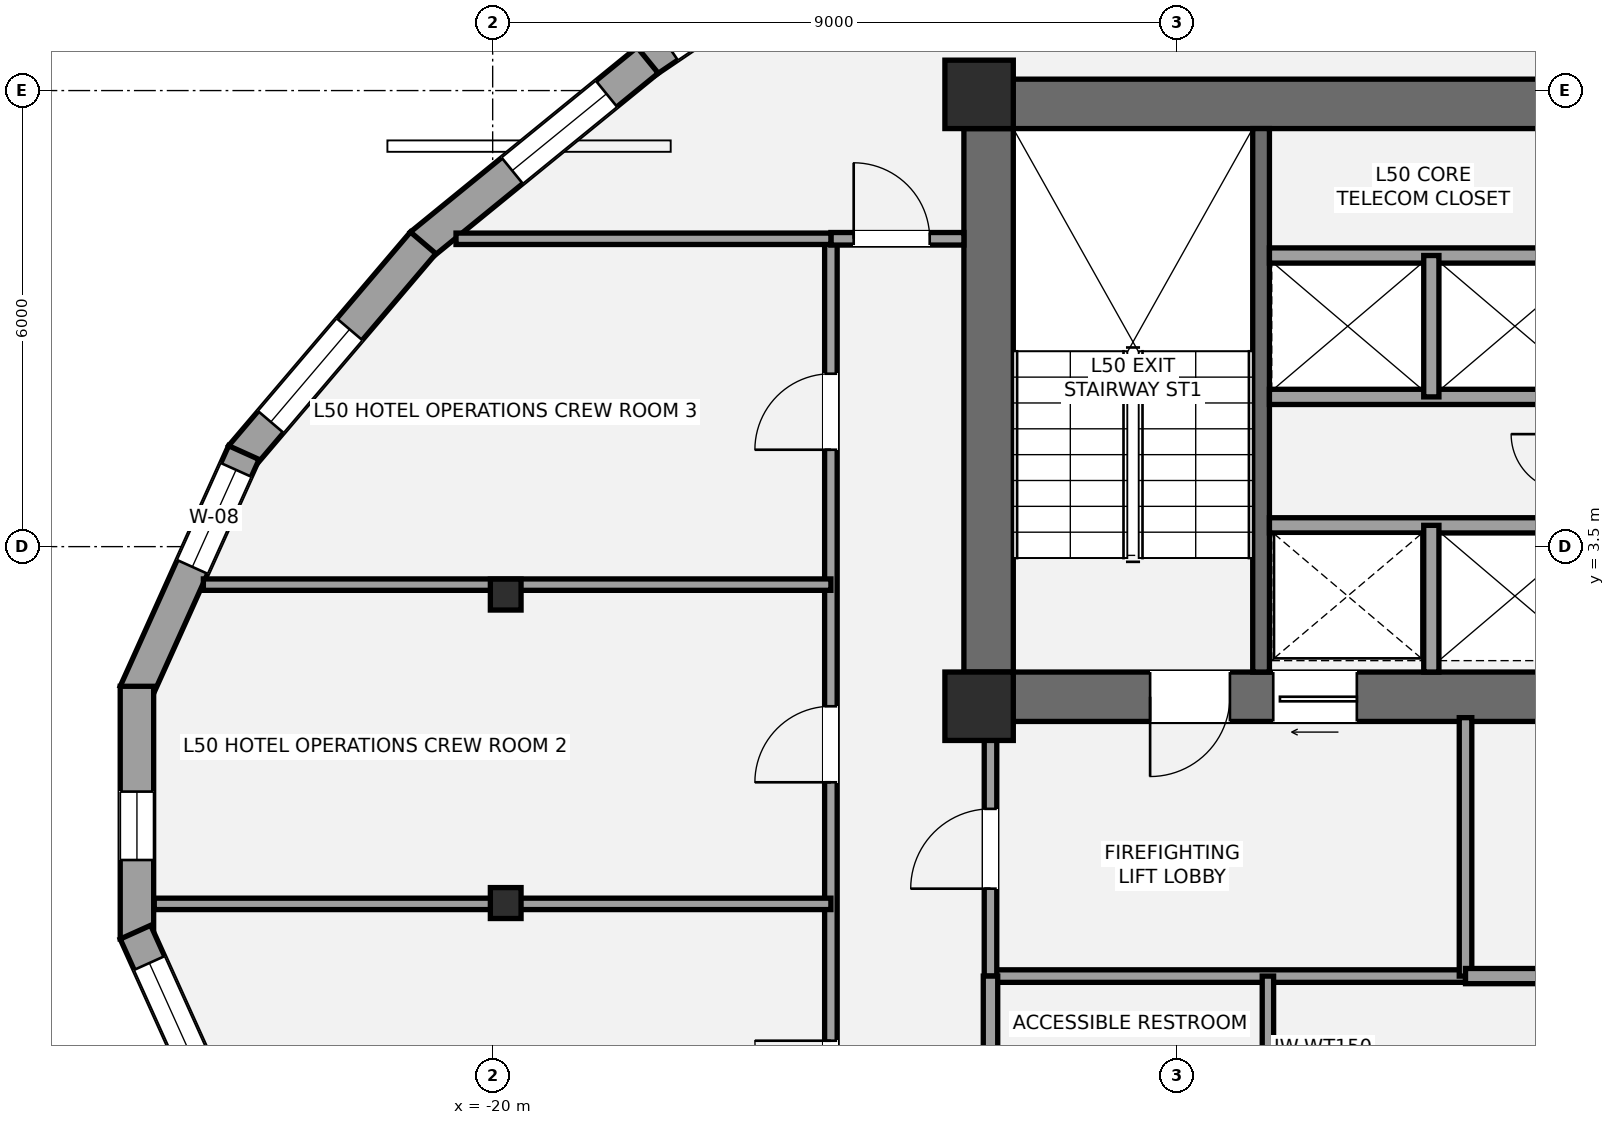
"""IFC4 building model, lengths in metres.
Left out: names, types, materials, properties, quantities, classifications, styles, units other than length and angle.
Written with IfcOpenShell. Run it as: python <this file> out.ifc"""

import sys

from ifc_helpers import new_model, si_unit, direction, frame, frame_2d, origin, origin_2d, place, context, subcontext, project, spatial, rectangle, i_section, extrude, element, fill, save


model = new_model("IFC4")
c1 = context("Model", 3, precision=1e-05, world=origin(), true_north=direction((0.0, 1.0)))
c2 = subcontext(c1, "Body", "Model", "MODEL_VIEW")
j1 = project(units=[si_unit("LENGTHUNIT", "METRE"), si_unit("PLANEANGLEUNIT", "RADIAN")], contexts=[c1])
p1 = place(None, origin())
s1 = spatial("IfcSite", under=j1, at=p1, CompositionType="ELEMENT")
p2 = place(p1, origin())
s2 = spatial("IfcBuilding", under=s1, at=p2, CompositionType="ELEMENT")
p3 = place(p2, frame((0.0, 0.0, 182.2)))
s3 = spatial("IfcBuildingStorey", under=s2, at=p3, CompositionType="ELEMENT", Elevation=182.2)
p4 = place(p3, frame((-13.475, 1.2, 0.0), z_axis=(0.0, 0.0, 1.0), x_axis=(0.0, 1.0, 0.0)))
e1 = element("IfcWall", 1, at=p4, inside=s3, PredefinedType="SHEAR", context=c2, shape_type="SweptSolid", body=[
    extrude(rectangle(XDim=8.45, YDim=0.65, at=frame_2d((4.225, 0.0))), origin(), (0.0, 0.0, 1.0), 3.2),
])
p5 = place(p3, frame((-13.8, 9.325, 0.0), z_axis=(0.0, 0.0, 1.0), x_axis=(1.0, 0.0, 0.0)))
e2 = element("IfcWall", 2, at=p5, inside=s3, PredefinedType="SHEAR", context=c2, shape_type="SweptSolid", body=[
    extrude(rectangle(XDim=9.325, YDim=0.65, at=frame_2d((4.663, 0.0))), origin(), (0.0, 0.0, 1.0), 3.2),
])
p6 = place(p3, frame((-4.875, 1.525, 0.0), z_axis=(0.0, 0.0, 1.0), x_axis=(-1.0, 0.0, 0.0)))
e3 = element("IfcWall", 3, at=p6, inside=s3, PredefinedType="SHEAR", context=c2, shape_type="SweptSolid", body=[
    extrude(rectangle(XDim=8.925, YDim=0.65, at=frame_2d((4.462, 0.0))), origin(), (0.0, 0.0, 1.0), 3.2),
])
p7 = place(p6, frame((5.425, 0.0, 0.0)))
e4 = element("IfcOpeningElement", 4, at=p7, cuts=e3, PredefinedType="OPENING", context=c2, shape_type="SweptSolid", body=[
    extrude(rectangle(XDim=1.05, YDim=2.15, at=frame_2d((0.525, 1.075))), frame((0.0, 0.335, 0.0), z_axis=(0.0, -1.0, 0.0), x_axis=(1.0, 0.0, 0.0)), (0.0, 0.0, 1.0), 0.67),
])
p8 = place(p6, frame((3.755, 0.0, 0.0)))
e5 = element("IfcOpeningElement", 5, at=p8, cuts=e3, PredefinedType="OPENING", context=c2, shape_type="SweptSolid", body=[
    extrude(rectangle(XDim=1.1, YDim=2.2, at=frame_2d((0.55, 1.1))), frame((0.0, 0.335, 0.0), z_axis=(0.0, -1.0, 0.0), x_axis=(1.0, 0.0, 0.0)), (0.0, 0.0, 1.0), 0.67),
])
p9 = place(p3, frame((-9.89, 1.85, 0.0), z_axis=(0.0, 0.0, 1.0), x_axis=(0.0, 1.0, 0.0)))
e6 = element("IfcWall", 6, at=p9, inside=s3, PredefinedType="SHEAR", context=c2, shape_type="SweptSolid", body=[
    extrude(rectangle(XDim=7.15, YDim=0.22, at=frame_2d((3.575, 0.0))), origin(), (0.0, 0.0, 1.0), 3.2),
])
for number, where, z_axis, x_axis in (
    (7, (-13.6, 1.4, 0.0), (0.0, 0.0, 1.0), (1.0, 0.0, 0.0)),
    (8, (-13.6, 9.45, 0.0), (0.0, 0.0, 1.0), (1.0, 0.0, 0.0)),
):
    element("IfcColumn", number, at=place(p3, frame(where, z_axis=z_axis, x_axis=x_axis)), inside=s3, PredefinedType="COLUMN", context=c2, shape_type="SweptSolid", body=[
        extrude(rectangle(XDim=0.9, YDim=0.9, at=origin_2d()), origin(), (0.0, 0.0, 1.0), 3.2),
    ])
for number, where, z_axis, x_axis in (
    (9, (-19.828, 2.869, 0.0), (0.0, 0.0, 1.0), (1.0, 0.0, 0.0)),
    (10, (-19.828, -1.189, 0.0), (0.0, 0.0, 1.0), (1.0, 0.0, 0.0)),
):
    element("IfcColumn", number, at=place(p3, frame(where, z_axis=z_axis, x_axis=x_axis)), inside=s3, PredefinedType="COLUMN", context=c2, shape_type="SweptSolid", body=[
        extrude(i_section(OverallWidth=0.404, OverallDepth=0.407, WebThickness=0.027, FlangeThickness=0.044, at=origin_2d()), origin(), (0.0, 0.0, 1.0), 3.2),
    ])
p10 = place(p3, frame((-17.976, 9.888, 0.0), z_axis=(0.0, 0.0, 1.0), x_axis=(0.827733986143, 0.561120707321, 0.0)))
e11 = element("IfcWall", 11, at=p10, inside=s3, PredefinedType="STANDARD", context=c2, shape_type="SweptSolid", body=[
    extrude(rectangle(XDim=3.921, YDim=0.44, at=frame_2d((1.96, 0.0))), origin(), (0.0, 0.0, 1.0), 2.315),
])
p11 = place(p10, frame((0.348, 0.0, 0.58)))
e12 = element("IfcOpeningElement", 12, at=p11, cuts=e11, PredefinedType="OPENING", context=c2, shape_type="SweptSolid", body=[
    extrude(rectangle(XDim=1.4, YDim=1.55, at=frame_2d((0.7, 0.775))), frame((0.0, 0.23, 0.0), z_axis=(0.0, -1.0, 0.0), x_axis=(1.0, 0.0, 0.0)), (0.0, 0.0, 1.0), 0.46),
])
p12 = place(p3, frame((-20.943, 7.469, 0.0), z_axis=(0.0, 0.0, 1.0), x_axis=(0.77522232587, 0.631688487684, 0.0)))
e13 = element("IfcWall", 13, at=p12, inside=s3, PredefinedType="STANDARD", context=c2, shape_type="SweptSolid", body=[
    extrude(rectangle(XDim=3.847, YDim=0.44, at=frame_2d((1.924, 0.0))), origin(), (0.0, 0.0, 1.0), 2.315),
])
p13 = place(p12, frame((1.548, 0.0, 0.58)))
e14 = element("IfcOpeningElement", 14, at=p13, cuts=e13, PredefinedType="OPENING", context=c2, shape_type="SweptSolid", body=[
    extrude(rectangle(XDim=1.6, YDim=1.55, at=frame_2d((0.8, 0.775))), frame((0.0, 0.23, 0.0), z_axis=(0.0, -1.0, 0.0), x_axis=(1.0, 0.0, 0.0)), (0.0, 0.0, 1.0), 0.46),
])
p14 = place(p3, frame((-23.307, 4.685, 0.0), z_axis=(0.0, 0.0, 1.0), x_axis=(0.648014991522, 0.761627580096, 0.0)))
e15 = element("IfcWall", 15, at=p14, inside=s3, PredefinedType="STANDARD", context=c2, shape_type="SweptSolid", body=[
    extrude(rectangle(XDim=3.692, YDim=0.44, at=frame_2d((1.846, 0.0))), origin(), (0.0, 0.0, 1.0), 2.315),
])
p15 = place(p14, frame((0.598, 0.0, 0.58)))
e16 = element("IfcOpeningElement", 16, at=p15, cuts=e15, PredefinedType="OPENING", context=c2, shape_type="SweptSolid", body=[
    extrude(rectangle(XDim=1.6, YDim=1.55, at=frame_2d((0.8, 0.775))), frame((0.0, 0.23, 0.0), z_axis=(0.0, -1.0, 0.0), x_axis=(1.0, 0.0, 0.0)), (0.0, 0.0, 1.0), 0.46),
])
p16 = place(p3, frame((-24.7, 1.572, 0.0), z_axis=(0.0, 0.0, 1.0), x_axis=(0.410812065386, 0.911720048553, 0.0)))
e17 = element("IfcWall", 17, at=p16, inside=s3, PredefinedType="STANDARD", context=c2, shape_type="SweptSolid", body=[
    extrude(rectangle(XDim=3.471, YDim=0.44, at=frame_2d((1.736, 0.0))), origin(), (0.0, 0.0, 1.0), 2.315),
])
p17 = place(p16, frame((1.822, 0.0, 0.58)))
e18 = element("IfcOpeningElement", 18, at=p17, cuts=e17, PredefinedType="OPENING", context=c2, shape_type="SweptSolid", body=[
    extrude(rectangle(XDim=1.4, YDim=1.55, at=frame_2d((0.7, 0.775))), frame((0.0, 0.23, 0.0), z_axis=(0.0, -1.0, 0.0), x_axis=(1.0, 0.0, 0.0)), (0.0, 0.0, 1.0), 0.46),
])
p18 = place(p3, frame((-24.68, -1.663, 0.0), z_axis=(0.0, 0.0, 1.0), x_axis=(0.0, 1.0, 0.0)))
e19 = element("IfcWall", 19, at=p18, inside=s3, PredefinedType="STANDARD", context=c2, shape_type="SweptSolid", body=[
    extrude(rectangle(XDim=3.325, YDim=0.44, at=frame_2d((1.663, 0.0))), origin(), (0.0, 0.0, 1.0), 2.315),
])
p19 = place(p18, frame((1.04, 0.0, 0.58)))
e20 = element("IfcOpeningElement", 20, at=p19, cuts=e19, PredefinedType="OPENING", context=c2, shape_type="SweptSolid", body=[
    extrude(rectangle(XDim=0.9, YDim=1.35, at=frame_2d((0.45, 0.675))), frame((0.0, 0.23, 0.0), z_axis=(0.0, -1.0, 0.0), x_axis=(1.0, 0.0, 0.0)), (0.0, 0.0, 1.0), 0.46),
])
p20 = place(p3, frame((-23.274, -4.737, 0.0), z_axis=(0.0, 0.0, 1.0), x_axis=(-0.410812065386, 0.911720048553, 0.0)))
e21 = element("IfcWall", 21, at=p20, inside=s3, PredefinedType="STANDARD", context=c2, shape_type="SweptSolid", body=[
    extrude(rectangle(XDim=3.471, YDim=0.44, at=frame_2d((1.736, 0.0))), origin(), (0.0, 0.0, 1.0), 2.315),
])
p21 = place(p20, frame((1.426, 0.0, 0.58)))
e22 = element("IfcOpeningElement", 22, at=p21, cuts=e21, PredefinedType="OPENING", context=c2, shape_type="SweptSolid", body=[
    extrude(rectangle(XDim=1.6, YDim=1.55, at=frame_2d((0.8, 0.775))), frame((0.0, 0.23, 0.0), z_axis=(0.0, -1.0, 0.0), x_axis=(1.0, 0.0, 0.0)), (0.0, 0.0, 1.0), 0.46),
])
p22 = place(p3, frame((-13.45, -2.15, 0.0), z_axis=(0.0, 0.0, 1.0), x_axis=(1.0, 0.0, 0.0)))
e23 = element("IfcWall", 23, at=p22, inside=s3, PredefinedType="PARTITIONING", context=c2, shape_type="SweptSolid", body=[
    extrude(rectangle(XDim=6.25, YDim=0.165, at=frame_2d((3.125, 0.0))), origin(), (0.0, 0.0, 1.0), 3.02),
])
p23 = place(p3, frame((-13.45, -2.15, 0.0), z_axis=(0.0, 0.0, 1.0), x_axis=(0.0, 1.0, 0.0)))
e24 = element("IfcWall", 24, at=p23, inside=s3, PredefinedType="PARTITIONING", context=c2, shape_type="SweptSolid", body=[
    extrude(rectangle(XDim=3.4, YDim=0.165, at=frame_2d((1.7, 0.0))), origin(), (0.0, 0.0, 1.0), 2.473),
])
p24 = place(p23, frame((1.15, 0.0, 0.0)))
e25 = element("IfcOpeningElement", 25, at=p24, cuts=e24, PredefinedType="OPENING", context=c2, shape_type="SweptSolid", body=[
    extrude(rectangle(XDim=1.05, YDim=2.15, at=frame_2d((0.525, 1.075))), frame((0.0, 0.093, 0.0), z_axis=(0.0, -1.0, 0.0), x_axis=(1.0, 0.0, 0.0)), (0.0, 0.0, 1.0), 0.185),
])
p25 = place(p3, frame((-7.2, -2.15, 0.0), z_axis=(0.0, 0.0, 1.0), x_axis=(0.0, 1.0, 0.0)))
e26 = element("IfcWall", 26, at=p25, inside=s3, PredefinedType="PARTITIONING", context=c2, shape_type="SweptSolid", body=[
    extrude(rectangle(XDim=3.4, YDim=0.165, at=frame_2d((1.7, 0.0))), origin(), (0.0, 0.0, 1.0), 2.473),
])
p26 = place(p3, frame((-7.2, -2.15, 0.0), z_axis=(0.0, 0.0, 1.0), x_axis=(1.0, 0.0, 0.0)))
e27 = element("IfcWall", 27, at=p26, inside=s3, PredefinedType="SOLIDWALL", context=c2, shape_type="SweptSolid", body=[
    extrude(rectangle(XDim=2.25, YDim=0.2, at=frame_2d((1.125, 0.0))), origin(), (0.0, 0.0, 1.0), 3.02),
])
p27 = place(p3, frame((-9.78, 3.78, 0.0), z_axis=(0.0, 0.0, 1.0), x_axis=(1.0, 0.0, 0.0)))
e28 = element("IfcWall", 28, at=p27, inside=s3, PredefinedType="SOLIDWALL", context=c2, shape_type="SweptSolid", body=[
    extrude(rectangle(XDim=4.255, YDim=0.2, at=frame_2d((2.127, 0.0))), origin(), (0.0, 0.0, 1.0), 3.02),
])
p28 = place(p3, frame((-7.65, 1.85, 0.0), z_axis=(0.0, 0.0, 1.0), x_axis=(0.0, 1.0, 0.0)))
e29 = element("IfcWall", 29, at=p28, inside=s3, PredefinedType="SOLIDWALL", context=c2, shape_type="SweptSolid", body=[
    extrude(rectangle(XDim=1.93, YDim=0.2, at=frame_2d((0.965, 0.0))), origin(), (0.0, 0.0, 1.0), 3.02),
])
for number, where, z_axis, x_axis in (
    (30, (-9.78, 5.47, 0.0), (0.0, 0.0, 1.0), (1.0, 0.0, 0.0)),
    (31, (-9.78, 7.33, 0.0), (0.0, 0.0, 1.0), (1.0, 0.0, 0.0)),
):
    element("IfcWall", number, at=place(p3, frame(where, z_axis=z_axis, x_axis=x_axis)), inside=s3, PredefinedType="SOLIDWALL", context=c2, shape_type="SweptSolid", body=[
        extrude(rectangle(XDim=4.255, YDim=0.2, at=frame_2d((2.127, 0.0))), origin(), (0.0, 0.0, 1.0), 3.02),
    ])
p29 = place(p3, frame((-7.65, 5.47, 0.0), z_axis=(0.0, 0.0, 1.0), x_axis=(0.0, 1.0, 0.0)))
e32 = element("IfcWall", 32, at=p29, inside=s3, PredefinedType="SOLIDWALL", context=c2, shape_type="SweptSolid", body=[
    extrude(rectangle(XDim=1.86, YDim=0.2, at=frame_2d((0.93, 0.0))), origin(), (0.0, 0.0, 1.0), 3.02),
])
p30 = place(p3, frame((-13.45, -4.05, 0.0), z_axis=(0.0, 0.0, 1.0), x_axis=(0.0, 1.0, 0.0)))
e33 = element("IfcWall", 33, at=p30, inside=s3, PredefinedType="PLUMBINGWALL", context=c2, shape_type="SweptSolid", body=[
    extrude(rectangle(XDim=1.9, YDim=0.19, at=frame_2d((0.95, 0.0))), origin(), (0.0, 0.0, 1.0), 2.473),
])
p31 = place(p3, frame((-9.8, -4.05, 0.0), z_axis=(0.0, 0.0, 1.0), x_axis=(0.0, 1.0, 0.0)))
e34 = element("IfcWall", 34, at=p31, inside=s3, PredefinedType="PLUMBINGWALL", context=c2, shape_type="SweptSolid", body=[
    extrude(rectangle(XDim=1.9, YDim=0.15, at=frame_2d((0.95, 0.0))), origin(), (0.0, 0.0, 1.0), 3.02),
])
p32 = place(p3, frame((-15.55, -11.257, 0.0), z_axis=(0.0, 0.0, 1.0), x_axis=(0.0, 1.0, 0.0)))
e35 = element("IfcWall", 35, at=p32, inside=s3, PredefinedType="PARTITIONING", context=c2, shape_type="SweptSolid", body=[
    extrude(rectangle(XDim=18.807, YDim=0.165, at=frame_2d((9.403, 0.0))), origin(), (0.0, 0.0, 1.0), 2.473),
])
p33 = place(p32, frame((4.106, 0.0, 0.0)))
e36 = element("IfcOpeningElement", 36, at=p33, cuts=e35, PredefinedType="OPENING", context=c2, shape_type="SweptSolid", body=[
    extrude(rectangle(XDim=0.85, YDim=2.1, at=frame_2d((0.425, 1.05))), frame((0.0, 0.093, 0.0), z_axis=(0.0, -1.0, 0.0), x_axis=(1.0, 0.0, 0.0)), (0.0, 0.0, 1.0), 0.185),
])
p34 = place(p32, frame((7.257, 0.0, 0.0)))
e37 = element("IfcOpeningElement", 37, at=p34, cuts=e35, PredefinedType="OPENING", context=c2, shape_type="SweptSolid", body=[
    extrude(rectangle(XDim=1.0, YDim=2.15, at=frame_2d((0.5, 1.075))), frame((0.0, 0.093, 0.0), z_axis=(0.0, -1.0, 0.0), x_axis=(1.0, 0.0, 0.0)), (0.0, 0.0, 1.0), 0.185),
])
p35 = place(p32, frame((11.656, 0.0, 0.0)))
e38 = element("IfcOpeningElement", 38, at=p35, cuts=e35, PredefinedType="OPENING", context=c2, shape_type="SweptSolid", body=[
    extrude(rectangle(XDim=1.0, YDim=2.15, at=frame_2d((0.5, 1.075))), frame((0.0, 0.093, 0.0), z_axis=(0.0, -1.0, 0.0), x_axis=(1.0, 0.0, 0.0)), (0.0, 0.0, 1.0), 0.185),
])
p36 = place(p32, frame((16.031, 0.0, 0.0)))
e39 = element("IfcOpeningElement", 39, at=p36, cuts=e35, PredefinedType="OPENING", context=c2, shape_type="SweptSolid", body=[
    extrude(rectangle(XDim=1.0, YDim=2.15, at=frame_2d((0.5, 1.075))), frame((0.0, 0.093, 0.0), z_axis=(0.0, -1.0, 0.0), x_axis=(1.0, 0.0, 0.0)), (0.0, 0.0, 1.0), 0.185),
])
p37 = place(p3, frame((-15.55, 7.55, 0.0), z_axis=(0.0, 0.0, 1.0), x_axis=(1.0, 0.0, 0.0)))
e40 = element("IfcWall", 40, at=p37, inside=s3, PredefinedType="PARTITIONING", context=c2, shape_type="SweptSolid", body=[
    extrude(rectangle(XDim=1.75, YDim=0.165, at=frame_2d((0.875, 0.0))), origin(), (0.0, 0.0, 1.0), 3.02),
])
p38 = place(p37, frame((0.3, 0.0, 0.0)))
e41 = element("IfcOpeningElement", 41, at=p38, cuts=e40, PredefinedType="OPENING", context=c2, shape_type="SweptSolid", body=[
    extrude(rectangle(XDim=1.0, YDim=2.15, at=frame_2d((0.5, 1.075))), frame((0.0, 0.093, 0.0), z_axis=(0.0, -1.0, 0.0), x_axis=(1.0, 0.0, 0.0)), (0.0, 0.0, 1.0), 0.185),
])
p39 = place(p3, frame((-20.482, 7.55, 0.0), z_axis=(0.0, 0.0, 1.0), x_axis=(1.0, 0.0, 0.0)))
e42 = element("IfcWall", 42, at=p39, inside=s3, PredefinedType="PLUMBINGWALL", context=c2, shape_type="SweptSolid", body=[
    extrude(rectangle(XDim=4.932, YDim=0.15, at=frame_2d((2.466, 0.0))), origin(), (0.0, 0.0, 1.0), 2.473),
])
p40 = place(p3, frame((-24.452, -1.2, 0.0), z_axis=(0.0, 0.0, 1.0), x_axis=(1.0, 0.0, 0.0)))
e43 = element("IfcWall", 43, at=p40, inside=s3, PredefinedType="PLUMBINGWALL", context=c2, shape_type="SweptSolid", body=[
    extrude(rectangle(XDim=8.902, YDim=0.15, at=frame_2d((4.451, 0.0))), origin(), (0.0, 0.0, 1.0), 2.398),
])
p41 = place(p3, frame((-23.806, 3.0, 0.0), z_axis=(0.0, 0.0, 1.0), x_axis=(1.0, 0.0, 0.0)))
e44 = element("IfcWall", 44, at=p41, inside=s3, PredefinedType="PLUMBINGWALL", context=c2, shape_type="SweptSolid", body=[
    extrude(rectangle(XDim=8.256, YDim=0.15, at=frame_2d((4.128, 0.0))), origin(), (0.0, 0.0, 1.0), 2.473),
])
p42 = place(p13, origin())
e45 = element("IfcWindow", 45, at=p42, inside=s3, PartitioningType="SINGLE_PANEL", PredefinedType="WINDOW", context=c2, shape_type="SweptSolid", body=[
    extrude(rectangle(XDim=1.6, YDim=1.55, at=frame_2d((0.8, 0.775))), frame((0.0, -0.01, 0.0), z_axis=(0.0, -1.0, 0.0), x_axis=(1.0, 0.0, 0.0)), (0.0, 0.0, 1.0), 0.06),
])
fill(e14, e45)
p43 = place(p15, origin())
e46 = element("IfcWindow", 46, at=p43, inside=s3, PartitioningType="SINGLE_PANEL", PredefinedType="WINDOW", context=c2, shape_type="SweptSolid", body=[
    extrude(rectangle(XDim=1.6, YDim=1.55, at=frame_2d((0.8, 0.775))), frame((0.0, -0.01, 0.0), z_axis=(0.0, -1.0, 0.0), x_axis=(1.0, 0.0, 0.0)), (0.0, 0.0, 1.0), 0.06),
])
fill(e16, e46)
p44 = place(p17, origin())
e47 = element("IfcWindow", 47, at=p44, inside=s3, PartitioningType="SINGLE_PANEL", PredefinedType="WINDOW", context=c2, shape_type="SweptSolid", body=[
    extrude(rectangle(XDim=1.4, YDim=1.55, at=frame_2d((0.7, 0.775))), frame((0.0, -0.01, 0.0), z_axis=(0.0, -1.0, 0.0), x_axis=(1.0, 0.0, 0.0)), (0.0, 0.0, 1.0), 0.06),
])
fill(e18, e47)
p45 = place(p19, origin())
e48 = element("IfcWindow", 48, at=p45, inside=s3, PartitioningType="SINGLE_PANEL", PredefinedType="WINDOW", context=c2, shape_type="SweptSolid", body=[
    extrude(rectangle(XDim=0.9, YDim=1.35, at=frame_2d((0.45, 0.675))), frame((0.0, -0.01, 0.0), z_axis=(0.0, -1.0, 0.0), x_axis=(1.0, 0.0, 0.0)), (0.0, 0.0, 1.0), 0.06),
])
fill(e20, e48)
p46 = place(p21, origin())
e49 = element("IfcWindow", 49, at=p46, inside=s3, PartitioningType="SINGLE_PANEL", PredefinedType="WINDOW", context=c2, shape_type="SweptSolid", body=[
    extrude(rectangle(XDim=1.6, YDim=1.55, at=frame_2d((0.8, 0.775))), frame((0.0, -0.01, 0.0), z_axis=(0.0, -1.0, 0.0), x_axis=(1.0, 0.0, 0.0)), (0.0, 0.0, 1.0), 0.06),
])
fill(e22, e49)
p47 = place(p7, origin())
e50 = element("IfcDoor", 50, at=p47, inside=s3, OperationType="SINGLE_SWING_RIGHT", PredefinedType="DOOR", context=c2, shape_type="SweptSolid", body=[
    extrude(rectangle(XDim=1.05, YDim=2.15, at=frame_2d((0.525, 1.075))), frame((0.0, 0.025, 0.0), z_axis=(0.0, -1.0, 0.0), x_axis=(1.0, 0.0, 0.0)), (0.0, 0.0, 1.0), 0.05),
])
fill(e4, e50)
p48 = place(p24, origin())
e51 = element("IfcDoor", 51, at=p48, inside=s3, OperationType="SINGLE_SWING_LEFT", PredefinedType="DOOR", context=c2, shape_type="SweptSolid", body=[
    extrude(rectangle(XDim=1.05, YDim=2.15, at=frame_2d((0.525, 1.075))), frame((0.0, 0.025, 0.0), z_axis=(0.0, -1.0, 0.0), x_axis=(1.0, 0.0, 0.0)), (0.0, 0.0, 1.0), 0.05),
])
fill(e25, e51)
p49 = place(p8, origin())
e52 = element("IfcDoor", 52, at=p49, inside=s3, OperationType="SLIDING_TO_LEFT", PredefinedType="DOOR", context=c2, shape_type="SweptSolid", body=[
    extrude(rectangle(XDim=1.1, YDim=2.2, at=frame_2d((0.55, 1.1))), frame((0.0, 0.025, 0.0), z_axis=(0.0, -1.0, 0.0), x_axis=(1.0, 0.0, 0.0)), (0.0, 0.0, 1.0), 0.05),
])
fill(e5, e52)
p50 = place(p38, origin())
e53 = element("IfcDoor", 53, at=p50, inside=s3, OperationType="SINGLE_SWING_LEFT", PredefinedType="DOOR", context=c2, shape_type="SweptSolid", body=[
    extrude(rectangle(XDim=1.0, YDim=2.15, at=frame_2d((0.5, 1.075))), frame((0.0, 0.025, 0.0), z_axis=(0.0, -1.0, 0.0), x_axis=(1.0, 0.0, 0.0)), (0.0, 0.0, 1.0), 0.05),
])
fill(e41, e53)
p51 = place(p34, origin())
e54 = element("IfcDoor", 54, at=p51, inside=s3, OperationType="SINGLE_SWING_RIGHT", PredefinedType="DOOR", context=c2, shape_type="SweptSolid", body=[
    extrude(rectangle(XDim=1.0, YDim=2.15, at=frame_2d((0.5, 1.075))), frame((0.0, 0.025, 0.0), z_axis=(0.0, -1.0, 0.0), x_axis=(1.0, 0.0, 0.0)), (0.0, 0.0, 1.0), 0.05),
])
fill(e37, e54)
p52 = place(p35, origin())
e55 = element("IfcDoor", 55, at=p52, inside=s3, OperationType="SINGLE_SWING_LEFT", PredefinedType="DOOR", context=c2, shape_type="SweptSolid", body=[
    extrude(rectangle(XDim=1.0, YDim=2.15, at=frame_2d((0.5, 1.075))), frame((0.0, 0.025, 0.0), z_axis=(0.0, -1.0, 0.0), x_axis=(1.0, 0.0, 0.0)), (0.0, 0.0, 1.0), 0.05),
])
fill(e38, e55)
p53 = place(p36, origin())
e56 = element("IfcDoor", 56, at=p53, inside=s3, OperationType="SINGLE_SWING_LEFT", PredefinedType="DOOR", context=c2, shape_type="SweptSolid", body=[
    extrude(rectangle(XDim=1.0, YDim=2.15, at=frame_2d((0.5, 1.075))), frame((0.0, 0.025, 0.0), z_axis=(0.0, -1.0, 0.0), x_axis=(1.0, 0.0, 0.0)), (0.0, 0.0, 1.0), 0.05),
])
fill(e39, e56)
save(model, sys.argv[1])
